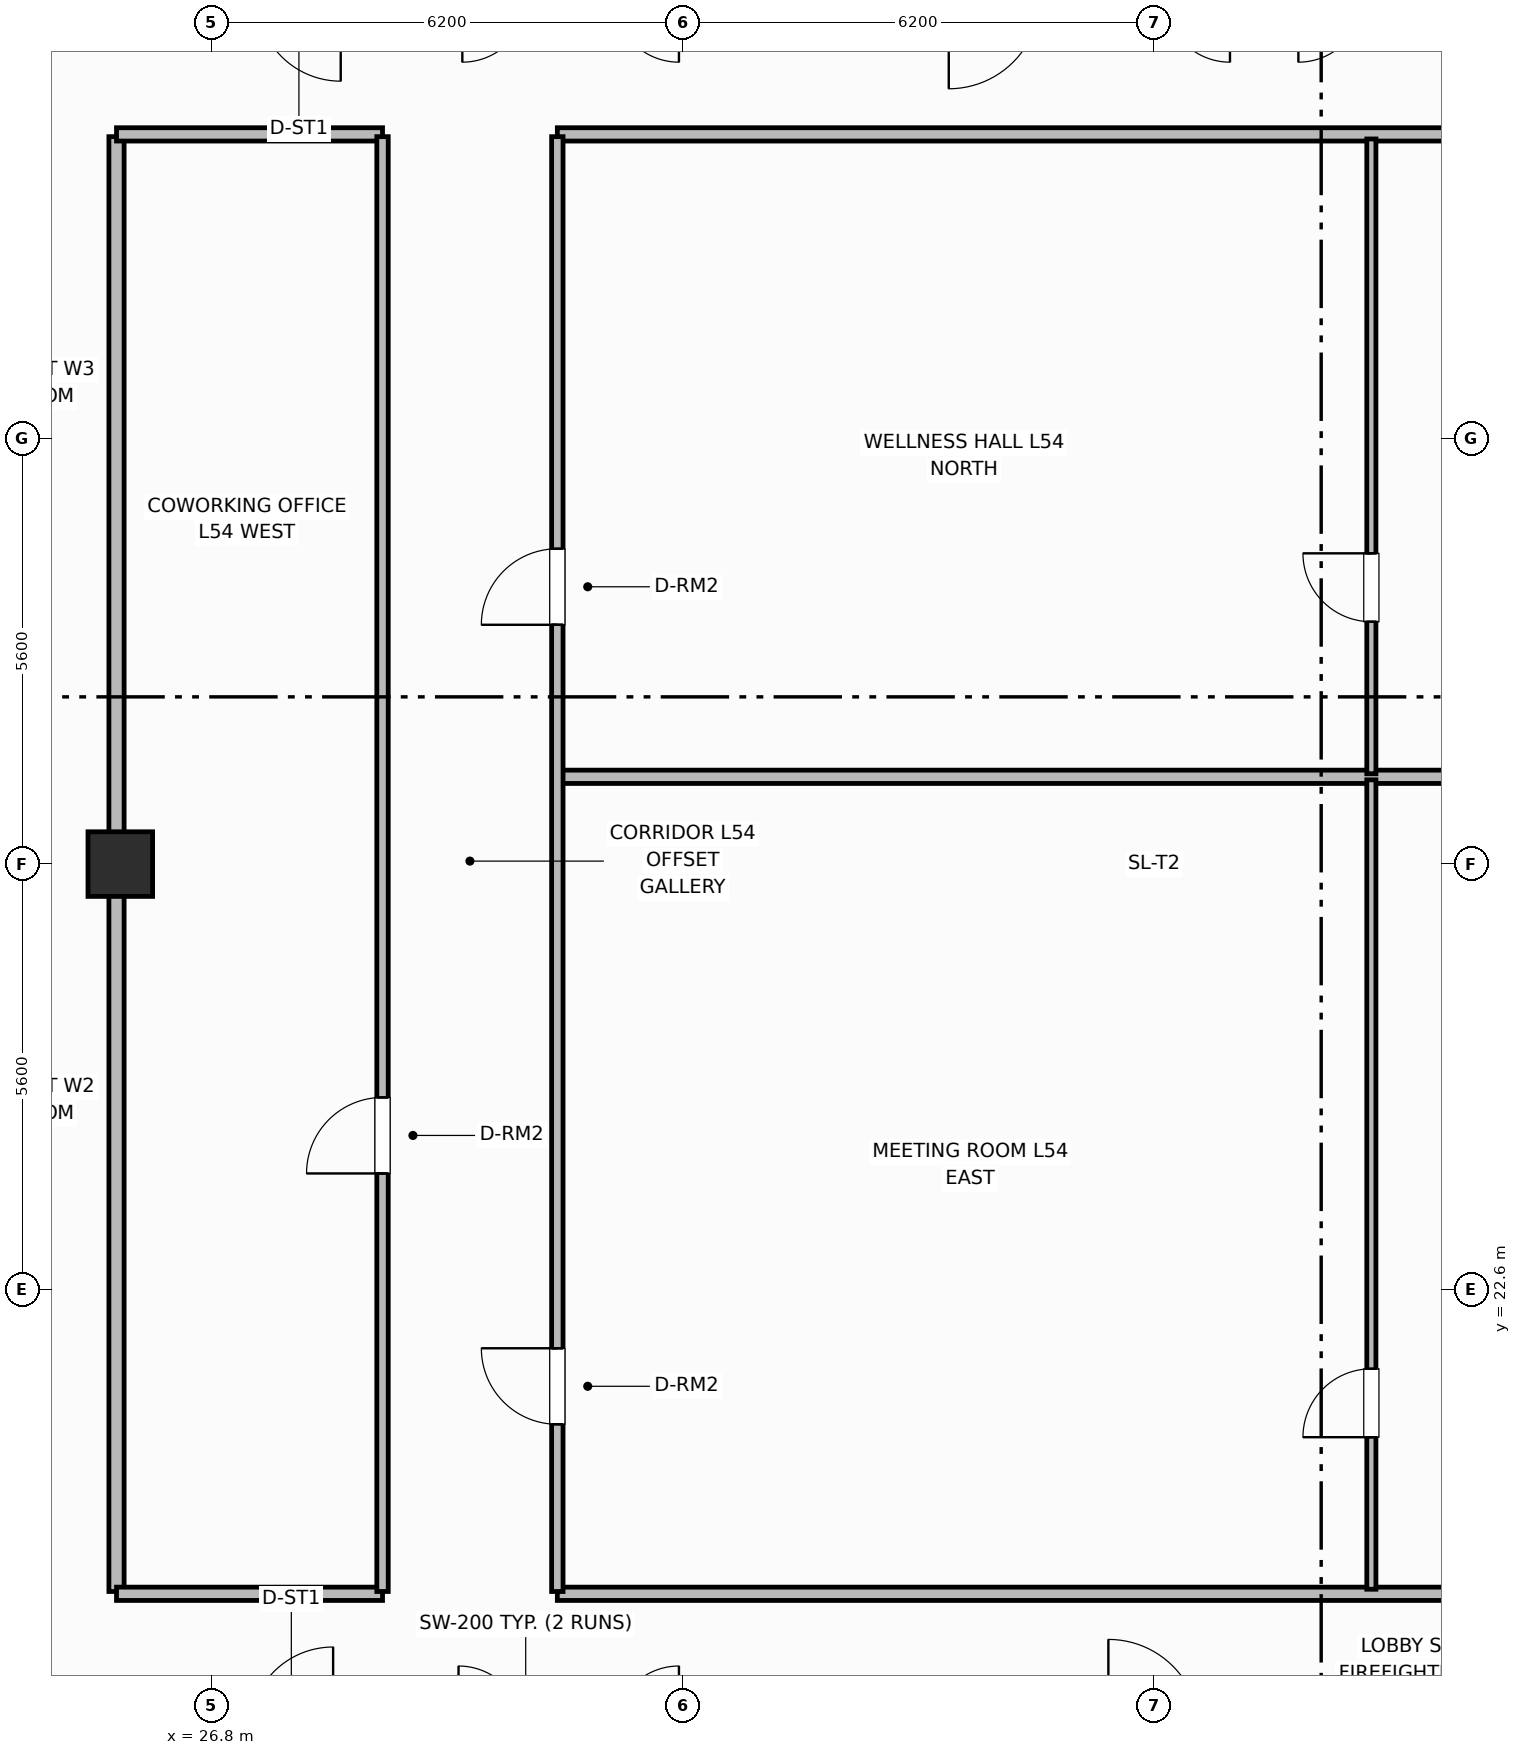
"""IFC4 building model, lengths in metres.
Left out: names, types, materials, properties, quantities, classifications, styles, units other than length and angle.
Written with IfcOpenShell. Run it as: python <this file> out.ifc"""

import sys

from ifc_helpers import new_model, si_unit, direction, frame, frame_2d, origin, origin_2d, place, context, subcontext, project, spatial, rectangle, extrude, element, fill, save


model = new_model("IFC4")
c1 = context("Model", 3, precision=1e-05, world=origin(), true_north=direction((0.0, 1.0)))
c2 = subcontext(c1, "Body", "Model", "MODEL_VIEW")
j1 = project(units=[si_unit("LENGTHUNIT", "METRE"), si_unit("PLANEANGLEUNIT", "RADIAN")], contexts=[c1])
p1 = place(None, origin())
s1 = spatial("IfcSite", under=j1, at=p1, CompositionType="ELEMENT")
p2 = place(p1, origin())
s2 = spatial("IfcBuilding", under=s1, at=p2, CompositionType="ELEMENT")
p3 = place(p2, frame((0.0, 0.0, 218.4)))
s3 = spatial("IfcBuildingStorey", under=s2, at=p3, CompositionType="ELEMENT", Elevation=218.4)
p4 = place(p3, frame((25.6, 28.2, 0.0), z_axis=(0.0, 0.0, 1.0), x_axis=(1.0, 0.0, 0.0)))
e1 = element("IfcColumn", 1, at=p4, inside=s3, PredefinedType="COLUMN", context=c2, shape_type="SweptSolid", body=[
    extrude(rectangle(XDim=0.85, YDim=0.85, at=origin_2d()), origin(), (0.0, 0.0, 1.0), 3.7),
])
p5 = place(p3, frame((25.55, 18.63, 0.0), z_axis=(0.0, 0.0, 1.0), x_axis=(0.0, 1.0, 0.0)))
e2 = element("IfcWall", 2, at=p5, inside=s3, PredefinedType="PARTITIONING", context=c2, shape_type="SweptSolid", body=[
    extrude(rectangle(XDim=19.14, YDim=0.2, at=frame_2d((9.57, 0.0))), origin(), (0.0, 0.0, 1.0), 2.55),
])
p6 = place(p3, frame((25.55, 18.6, 0.0), z_axis=(0.0, 0.0, 1.0), x_axis=(1.0, 0.0, 0.0)))
e3 = element("IfcWall", 3, at=p6, inside=s3, PredefinedType="PARTITIONING", context=c2, shape_type="SweptSolid", body=[
    extrude(rectangle(XDim=3.5, YDim=0.175, at=frame_2d((1.75, 0.0))), origin(), (0.0, 0.0, 1.0), 2.55),
])
p7 = place(p3, frame((31.35, 18.6, 0.0), z_axis=(0.0, 0.0, 1.0), x_axis=(1.0, 0.0, 0.0)))
e4 = element("IfcWall", 4, at=p7, inside=s3, PredefinedType="PARTITIONING", context=c2, shape_type="SweptSolid", body=[
    extrude(rectangle(XDim=21.5, YDim=0.175, at=frame_2d((10.75, 0.0))), origin(), (0.0, 0.0, 1.0), 2.55),
])
p8 = place(p3, frame((25.55, 37.8, 0.0), z_axis=(0.0, 0.0, 1.0), x_axis=(1.0, 0.0, 0.0)))
e5 = element("IfcWall", 5, at=p8, inside=s3, PredefinedType="PARTITIONING", context=c2, shape_type="SweptSolid", body=[
    extrude(rectangle(XDim=3.5, YDim=0.175, at=frame_2d((1.75, 0.0))), origin(), (0.0, 0.0, 1.0), 2.55),
])
p9 = place(p3, frame((31.35, 37.8, 0.0), z_axis=(0.0, 0.0, 1.0), x_axis=(1.0, 0.0, 0.0)))
e6 = element("IfcWall", 6, at=p9, inside=s3, PredefinedType="PARTITIONING", context=c2, shape_type="SweptSolid", body=[
    extrude(rectangle(XDim=21.5, YDim=0.175, at=frame_2d((10.75, 0.0))), origin(), (0.0, 0.0, 1.0), 2.55),
])
p10 = place(p3, frame((31.38, 29.348, 0.0), z_axis=(0.0, 0.0, 1.0), x_axis=(1.0, 0.0, 0.0)))
e7 = element("IfcWall", 7, at=p10, inside=s3, PredefinedType="PARTITIONING", context=c2, shape_type="SweptSolid", body=[
    extrude(rectangle(XDim=21.42, YDim=0.175, at=frame_2d((10.71, 0.0))), origin(), (0.0, 0.0, 1.0), 2.55),
])
p11 = place(p3, frame((42.06, 18.66, 0.0), z_axis=(0.0, 0.0, 1.0), x_axis=(0.0, 1.0, 0.0)))
e8 = element("IfcWall", 8, at=p11, inside=s3, PredefinedType="PARTITIONING", context=c2, shape_type="SweptSolid", body=[
    extrude(rectangle(XDim=10.648, YDim=0.12, at=frame_2d((5.324, 0.0))), origin(), (0.0, 0.0, 1.0), 2.55),
])
p12 = place(p11, frame((2.0, 0.0, 0.0)))
e9 = element("IfcOpeningElement", 9, at=p12, cuts=e8, PredefinedType="OPENING", context=c2, shape_type="SweptSolid", body=[
    extrude(rectangle(XDim=0.9, YDim=2.1, at=frame_2d((0.45, 1.05))), frame((0.0, 0.07, 0.0), z_axis=(0.0, -1.0, 0.0), x_axis=(1.0, 0.0, 0.0)), (0.0, 0.0, 1.0), 0.14),
])
p13 = place(p3, frame((42.06, 29.388, 0.0), z_axis=(0.0, 0.0, 1.0), x_axis=(0.0, 1.0, 0.0)))
e10 = element("IfcWall", 10, at=p13, inside=s3, PredefinedType="PARTITIONING", context=c2, shape_type="SweptSolid", body=[
    extrude(rectangle(XDim=8.352, YDim=0.12, at=frame_2d((4.176, 0.0))), origin(), (0.0, 0.0, 1.0), 2.55),
])
p14 = place(p13, frame((2.0, 0.0, 0.0)))
e11 = element("IfcOpeningElement", 11, at=p14, cuts=e10, PredefinedType="OPENING", context=c2, shape_type="SweptSolid", body=[
    extrude(rectangle(XDim=0.9, YDim=2.1, at=frame_2d((0.45, 1.05))), frame((0.0, 0.07, 0.0), z_axis=(0.0, -1.0, 0.0), x_axis=(1.0, 0.0, 0.0)), (0.0, 0.0, 1.0), 0.14),
])
p15 = place(p3, frame((29.05, 18.63, 0.0), z_axis=(0.0, 0.0, 1.0), x_axis=(0.0, 1.0, 0.0)))
e12 = element("IfcWall", 12, at=p15, inside=s3, PredefinedType="PARTITIONING", context=c2, shape_type="SweptSolid", body=[
    extrude(rectangle(XDim=19.14, YDim=0.15, at=frame_2d((9.57, 0.0))), origin(), (0.0, 0.0, 1.0), 2.55),
])
p16 = place(p15, frame((5.5, 0.0, 0.0)))
e13 = element("IfcOpeningElement", 13, at=p16, cuts=e12, PredefinedType="OPENING", context=c2, shape_type="SweptSolid", body=[
    extrude(rectangle(XDim=1.0, YDim=2.15, at=frame_2d((0.5, 1.075))), frame((0.0, 0.085, 0.0), z_axis=(0.0, -1.0, 0.0), x_axis=(1.0, 0.0, 0.0)), (0.0, 0.0, 1.0), 0.17),
])
p17 = place(p3, frame((31.35, 18.63, 0.0), z_axis=(0.0, 0.0, 1.0), x_axis=(0.0, 1.0, 0.0)))
e14 = element("IfcWall", 14, at=p17, inside=s3, PredefinedType="PARTITIONING", context=c2, shape_type="SweptSolid", body=[
    extrude(rectangle(XDim=19.14, YDim=0.15, at=frame_2d((9.57, 0.0))), origin(), (0.0, 0.0, 1.0), 2.55),
])
p18 = place(p17, frame((2.2, 0.0, 0.0)))
e15 = element("IfcOpeningElement", 15, at=p18, cuts=e14, PredefinedType="OPENING", context=c2, shape_type="SweptSolid", body=[
    extrude(rectangle(XDim=1.0, YDim=2.15, at=frame_2d((0.5, 1.075))), frame((0.0, 0.085, 0.0), z_axis=(0.0, -1.0, 0.0), x_axis=(1.0, 0.0, 0.0)), (0.0, 0.0, 1.0), 0.17),
])
p19 = place(p17, frame((12.719, 0.0, 0.0)))
e16 = element("IfcOpeningElement", 16, at=p19, cuts=e14, PredefinedType="OPENING", context=c2, shape_type="SweptSolid", body=[
    extrude(rectangle(XDim=1.0, YDim=2.15, at=frame_2d((0.5, 1.075))), frame((0.0, 0.085, 0.0), z_axis=(0.0, -1.0, 0.0), x_axis=(1.0, 0.0, 0.0)), (0.0, 0.0, 1.0), 0.17),
])
p20 = place(p12, origin())
e17 = element("IfcDoor", 17, at=p20, inside=s3, OperationType="SINGLE_SWING_LEFT", PredefinedType="DOOR", context=c2, shape_type="SweptSolid", body=[
    extrude(rectangle(XDim=0.9, YDim=2.1, at=frame_2d((0.45, 1.05))), frame((0.0, 0.025, 0.0), z_axis=(0.0, -1.0, 0.0), x_axis=(1.0, 0.0, 0.0)), (0.0, 0.0, 1.0), 0.05),
])
fill(e9, e17)
p21 = place(p14, origin())
e18 = element("IfcDoor", 18, at=p21, inside=s3, OperationType="SINGLE_SWING_RIGHT", PredefinedType="DOOR", context=c2, shape_type="SweptSolid", body=[
    extrude(rectangle(XDim=0.9, YDim=2.1, at=frame_2d((0.45, 1.05))), frame((0.0, 0.025, 0.0), z_axis=(0.0, -1.0, 0.0), x_axis=(1.0, 0.0, 0.0)), (0.0, 0.0, 1.0), 0.05),
])
fill(e11, e18)
p22 = place(p16, origin())
e19 = element("IfcDoor", 19, at=p22, inside=s3, OperationType="SINGLE_SWING_LEFT", PredefinedType="DOOR", context=c2, shape_type="SweptSolid", body=[
    extrude(rectangle(XDim=1.0, YDim=2.15, at=frame_2d((0.5, 1.075))), frame((0.0, 0.025, 0.0), z_axis=(0.0, -1.0, 0.0), x_axis=(1.0, 0.0, 0.0)), (0.0, 0.0, 1.0), 0.05),
])
fill(e13, e19)
p23 = place(p18, origin())
e20 = element("IfcDoor", 20, at=p23, inside=s3, OperationType="SINGLE_SWING_RIGHT", PredefinedType="DOOR", context=c2, shape_type="SweptSolid", body=[
    extrude(rectangle(XDim=1.0, YDim=2.15, at=frame_2d((0.5, 1.075))), frame((0.0, 0.025, 0.0), z_axis=(0.0, -1.0, 0.0), x_axis=(1.0, 0.0, 0.0)), (0.0, 0.0, 1.0), 0.05),
])
fill(e15, e20)
p24 = place(p19, origin())
e21 = element("IfcDoor", 21, at=p24, inside=s3, OperationType="SINGLE_SWING_LEFT", PredefinedType="DOOR", context=c2, shape_type="SweptSolid", body=[
    extrude(rectangle(XDim=1.0, YDim=2.15, at=frame_2d((0.5, 1.075))), frame((0.0, 0.025, 0.0), z_axis=(0.0, -1.0, 0.0), x_axis=(1.0, 0.0, 0.0)), (0.0, 0.0, 1.0), 0.05),
])
fill(e16, e21)
save(model, sys.argv[1])
